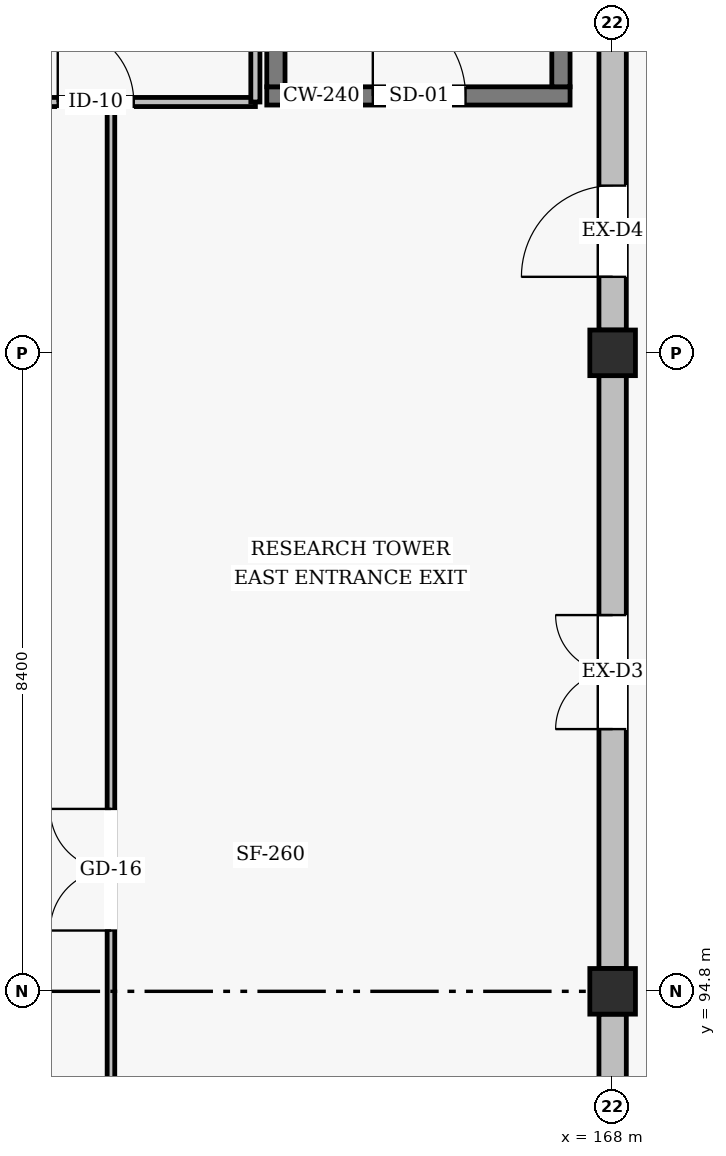
"""IFC4 building model, lengths in metres.
Left out: names, types, materials, properties, quantities, classifications, styles, units other than length and angle.
Written with IfcOpenShell. Run it as: python <this file> out.ifc"""

import sys

from ifc_helpers import new_model, si_unit, direction, frame, frame_2d, origin, origin_2d, place, context, subcontext, project, spatial, rectangle, hollow_rectangle, extrude, element, fill, save


model = new_model("IFC4")
c1 = context("Model", 3, precision=1e-05, world=origin(), true_north=direction((0.0, 1.0)))
c2 = subcontext(c1, "Body", "Model", "MODEL_VIEW")
j1 = project(units=[si_unit("LENGTHUNIT", "METRE"), si_unit("PLANEANGLEUNIT", "RADIAN")], contexts=[c1])
p1 = place(None, origin())
s1 = spatial("IfcSite", under=j1, at=p1, CompositionType="ELEMENT")
p2 = place(p1, origin())
s2 = spatial("IfcBuilding", under=s1, at=p2, CompositionType="ELEMENT")
p3 = place(p2, origin())
s3 = spatial("IfcBuildingStorey", under=s2, at=p3, CompositionType="ELEMENT", Elevation=0.0)
for number, where, z_axis, x_axis in (
    (1, (168.0, 94.8, 0.0), (0.0, 0.0, 1.0), (1.0, 0.0, 0.0)),
    (2, (168.0, 103.2, 0.0), (0.0, 0.0, 1.0), (1.0, 0.0, 0.0)),
):
    element("IfcColumn", number, at=place(p3, frame(where, z_axis=z_axis, x_axis=x_axis)), inside=s3, PredefinedType="COLUMN", context=c2, shape_type="SweptSolid", body=[
        extrude(hollow_rectangle(XDim=0.6, YDim=0.6, WallThickness=0.025, InnerFilletRadius=0.025, OuterFilletRadius=0.05, at=origin_2d()), origin(), (0.0, 0.0, 1.0), 4.8),
    ])
p4 = place(p3, frame((168.0, 86.7, 0.0), z_axis=(0.0, 0.0, 1.0), x_axis=(0.0, 1.0, 0.0)))
e3 = element("IfcWall", 3, at=p4, inside=s3, PredefinedType="SOLIDWALL", context=c2, shape_type="SweptSolid", body=[
    extrude(rectangle(XDim=7.8, YDim=0.36, at=frame_2d((3.9, 0.0))), origin(), (0.0, 0.0, 1.0), 4.06),
])
p5 = place(p4, frame((2.4, 0.0, 0.0)))
e4 = element("IfcOpeningElement", 4, at=p5, cuts=e3, PredefinedType="OPENING", context=c2, shape_type="SweptSolid", body=[
    extrude(rectangle(XDim=1.8, YDim=2.4, at=frame_2d((0.9, 1.2))), frame((0.0, 0.19, 0.0), z_axis=(0.0, -1.0, 0.0), x_axis=(1.0, 0.0, 0.0)), (0.0, 0.0, 1.0), 0.38),
])
p6 = place(p3, frame((168.0, 95.1, 0.0), z_axis=(0.0, 0.0, 1.0), x_axis=(0.0, 1.0, 0.0)))
e5 = element("IfcWall", 5, at=p6, inside=s3, PredefinedType="SOLIDWALL", context=c2, shape_type="SweptSolid", body=[
    extrude(rectangle(XDim=7.8, YDim=0.36, at=frame_2d((3.9, 0.0))), origin(), (0.0, 0.0, 1.0), 4.06),
])
p7 = place(p6, frame((3.15, 0.0, 0.0)))
e6 = element("IfcOpeningElement", 6, at=p7, cuts=e5, PredefinedType="OPENING", context=c2, shape_type="SweptSolid", body=[
    extrude(rectangle(XDim=1.5, YDim=2.2, at=frame_2d((0.75, 1.1))), frame((0.0, 0.19, 0.0), z_axis=(0.0, -1.0, 0.0), x_axis=(1.0, 0.0, 0.0)), (0.0, 0.0, 1.0), 0.38),
])
p8 = place(p3, frame((168.0, 103.5, 0.0), z_axis=(0.0, 0.0, 1.0), x_axis=(0.0, 1.0, 0.0)))
e7 = element("IfcWall", 7, at=p8, inside=s3, PredefinedType="SOLIDWALL", context=c2, shape_type="SweptSolid", body=[
    extrude(rectangle(XDim=11.35, YDim=0.36, at=frame_2d((5.675, 0.0))), origin(), (0.0, 0.0, 1.0), 3.768),
])
p9 = place(p8, frame((0.7, 0.0, 0.0)))
e8 = element("IfcOpeningElement", 8, at=p9, cuts=e7, PredefinedType="OPENING", context=c2, shape_type="SweptSolid", body=[
    extrude(rectangle(XDim=1.2, YDim=2.2, at=frame_2d((0.6, 1.1))), frame((0.0, 0.19, 0.0), z_axis=(0.0, -1.0, 0.0), x_axis=(1.0, 0.0, 0.0)), (0.0, 0.0, 1.0), 0.38),
])
p10 = place(p3, frame((163.45, 106.58, 0.0), z_axis=(0.0, 0.0, 1.0), x_axis=(1.0, 0.0, 0.0)))
e9 = element("IfcWall", 9, at=p10, inside=s3, PredefinedType="SHEAR", context=c2, shape_type="SweptSolid", body=[
    extrude(rectangle(XDim=3.99, YDim=0.24, at=frame_2d((1.995, 0.0))), origin(), (0.0, 0.0, 1.0), 4.56),
])
p11 = place(p10, frame((1.395, 0.0, 0.0)))
e10 = element("IfcOpeningElement", 10, at=p11, cuts=e9, PredefinedType="OPENING", context=c2, shape_type="SweptSolid", body=[
    extrude(rectangle(XDim=1.22, YDim=2.18, at=frame_2d((0.61, 1.09))), frame((0.0, 0.13, 0.0), z_axis=(0.0, -1.0, 0.0), x_axis=(1.0, 0.0, 0.0)), (0.0, 0.0, 1.0), 0.26),
])
for number, where, z_axis, x_axis in (
    (11, (163.57, 106.7, 0.0), (0.0, 0.0, 1.0), (0.0, 1.0, 0.0)),
    (12, (167.32, 106.7, 0.0), (0.0, 0.0, 1.0), (0.0, 1.0, 0.0)),
):
    element("IfcWall", number, at=place(p3, frame(where, z_axis=z_axis, x_axis=x_axis)), inside=s3, PredefinedType="SHEAR", context=c2, shape_type="SweptSolid", body=[
        extrude(rectangle(XDim=7.9, YDim=0.24, at=frame_2d((3.95, 0.0))), origin(), (0.0, 0.0, 1.0), 4.56),
    ])
p12 = place(p3, frame((161.4, 86.4, 0.0), z_axis=(0.0, 0.0, 1.0), x_axis=(0.0, 1.0, 0.0)))
e13 = element("IfcWall", 13, at=p12, inside=s3, PredefinedType="PARTITIONING", context=c2, shape_type="SweptSolid", body=[
    extrude(rectangle(XDim=20.0, YDim=0.1, at=frame_2d((10.0, 0.0))), origin(), (0.0, 0.0, 1.0), 3.91),
])
p13 = place(p12, frame((9.2, 0.0, 0.0)))
e14 = element("IfcOpeningElement", 14, at=p13, cuts=e13, PredefinedType="OPENING", context=c2, shape_type="SweptSolid", body=[
    extrude(rectangle(XDim=1.6, YDim=2.1, at=frame_2d((0.8, 1.05))), frame((0.0, 0.06, 0.0), z_axis=(0.0, -1.0, 0.0), x_axis=(1.0, 0.0, 0.0)), (0.0, 0.0, 1.0), 0.12),
])
p14 = place(p3, frame((159.1, 106.5, 0.0), z_axis=(0.0, 0.0, 1.0), x_axis=(1.0, 0.0, 0.0)))
e15 = element("IfcWall", 15, at=p14, inside=s3, PredefinedType="PARTITIONING", context=c2, shape_type="SweptSolid", body=[
    extrude(rectangle(XDim=4.2, YDim=0.12, at=frame_2d((2.1, 0.0))), origin(), (0.0, 0.0, 1.0), 4.56),
])
p15 = place(p14, frame((1.6, 0.0, 0.0)))
e16 = element("IfcOpeningElement", 16, at=p15, cuts=e15, PredefinedType="OPENING", context=c2, shape_type="SweptSolid", body=[
    extrude(rectangle(XDim=1.0, YDim=2.1, at=frame_2d((0.5, 1.05))), frame((0.0, 0.07, 0.0), z_axis=(0.0, -1.0, 0.0), x_axis=(1.0, 0.0, 0.0)), (0.0, 0.0, 1.0), 0.14),
])
p16 = place(p3, frame((163.3, 106.5, 0.0), z_axis=(0.0, 0.0, 1.0), x_axis=(0.0, 1.0, 0.0)))
e17 = element("IfcWall", 17, at=p16, inside=s3, PredefinedType="PARTITIONING", context=c2, shape_type="SweptSolid", body=[
    extrude(rectangle(XDim=8.3, YDim=0.12, at=frame_2d((4.15, 0.0))), origin(), (0.0, 0.0, 1.0), 4.56),
])
p17 = place(p7, frame((1.5, 0.0, 0.0), z_axis=(0.0, 0.0, 1.0), x_axis=(-1.0, 0.0, 0.0)))
e18 = element("IfcDoor", 18, at=p17, inside=s3, OperationType="DOUBLE_DOOR_SINGLE_SWING", PredefinedType="DOOR", context=c2, shape_type="SweptSolid", body=[
    extrude(rectangle(XDim=1.5, YDim=2.2, at=frame_2d((0.75, 1.1))), frame((0.0, 0.025, 0.0), z_axis=(0.0, -1.0, 0.0), x_axis=(1.0, 0.0, 0.0)), (0.0, 0.0, 1.0), 0.05),
])
fill(e6, e18)
p18 = place(p9, frame((1.2, 0.0, 0.0), z_axis=(0.0, 0.0, 1.0), x_axis=(-1.0, 0.0, 0.0)))
e19 = element("IfcDoor", 19, at=p18, inside=s3, OperationType="SINGLE_SWING_LEFT", PredefinedType="DOOR", context=c2, shape_type="SweptSolid", body=[
    extrude(rectangle(XDim=1.2, YDim=2.2, at=frame_2d((0.6, 1.1))), frame((0.0, 0.025, 0.0), z_axis=(0.0, -1.0, 0.0), x_axis=(1.0, 0.0, 0.0)), (0.0, 0.0, 1.0), 0.05),
])
fill(e8, e19)
p19 = place(p11, origin())
e20 = element("IfcDoor", 20, at=p19, inside=s3, OperationType="SINGLE_SWING_LEFT", PredefinedType="DOOR", context=c2, shape_type="SweptSolid", body=[
    extrude(rectangle(XDim=1.22, YDim=2.18, at=frame_2d((0.61, 1.09))), frame((0.0, 0.025, 0.0), z_axis=(0.0, -1.0, 0.0), x_axis=(1.0, 0.0, 0.0)), (0.0, 0.0, 1.0), 0.05),
])
fill(e10, e20)
p20 = place(p13, origin())
e21 = element("IfcDoor", 21, at=p20, inside=s3, OperationType="DOUBLE_DOOR_SINGLE_SWING", PredefinedType="DOOR", context=c2, shape_type="SweptSolid", body=[
    extrude(rectangle(XDim=1.6, YDim=2.1, at=frame_2d((0.8, 1.05))), frame((0.0, 0.025, 0.0), z_axis=(0.0, -1.0, 0.0), x_axis=(1.0, 0.0, 0.0)), (0.0, 0.0, 1.0), 0.05),
])
fill(e14, e21)
p21 = place(p15, origin())
e22 = element("IfcDoor", 22, at=p21, inside=s3, OperationType="SINGLE_SWING_LEFT", PredefinedType="DOOR", context=c2, shape_type="SweptSolid", body=[
    extrude(rectangle(XDim=1.0, YDim=2.1, at=frame_2d((0.5, 1.05))), frame((0.0, 0.025, 0.0), z_axis=(0.0, -1.0, 0.0), x_axis=(1.0, 0.0, 0.0)), (0.0, 0.0, 1.0), 0.05),
])
fill(e16, e22)
save(model, sys.argv[1])
